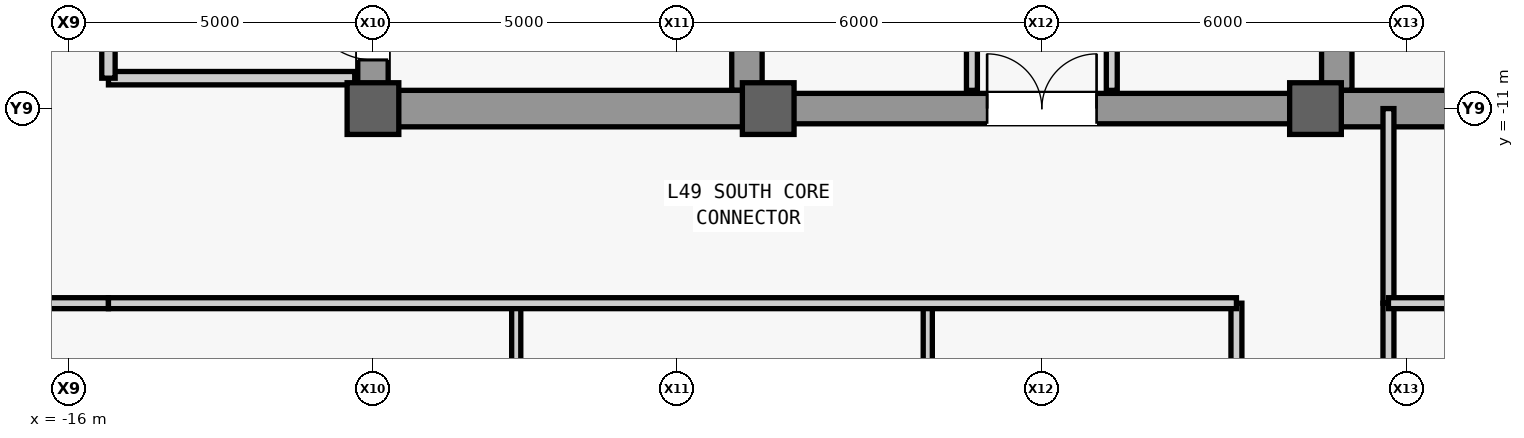
"""IFC4 building model, lengths in metres.
Left out: names, types, materials, properties, quantities, classifications, styles, units other than length and angle.
Written with IfcOpenShell. Run it as: python <this file> out.ifc"""

import sys

from ifc_helpers import new_model, si_unit, direction, frame, frame_2d, origin, origin_2d, place, context, subcontext, project, spatial, rectangle, extrude, source, transform, mapped, element, fill, save


model = new_model("IFC4")
c1 = context("Model", 3, precision=1e-05, world=origin(), true_north=direction((0.0, 1.0)))
c2 = subcontext(c1, "Body", "Model", "MODEL_VIEW")
j1 = project(units=[si_unit("LENGTHUNIT", "METRE"), si_unit("PLANEANGLEUNIT", "RADIAN")], contexts=[c1])
p1 = place(None, origin())
s1 = spatial("IfcSite", under=j1, at=p1, CompositionType="ELEMENT")
p2 = place(p1, origin())
s2 = spatial("IfcBuilding", under=s1, at=p2, CompositionType="ELEMENT")
p3 = place(p2, frame((0.0, 0.0, 211.1)))
s3 = spatial("IfcBuildingStorey", under=s2, at=p3, CompositionType="ELEMENT", Elevation=211.1)
m1 = source(origin(), c2, "Body", "SweptSolid", [
    extrude(rectangle(XDim=22.0, YDim=0.5, at=frame_2d((11.0, 0.0))), origin(), (0.0, 0.0, 1.0), 3.78),
])
p4 = place(p3, frame((-11.0, -11.0, 0.0), z_axis=(0.0, 0.0, 1.0), x_axis=(0.0, 1.0, 0.0)))
e1 = element("IfcWall", 1, at=p4, inside=s3, PredefinedType="SHEAR", context=c2, shape_type="MappedRepresentation", body=[
    mapped(m1, transform((0.0, 0.0, 0.0), scale=1.0)),
])
m2 = source(origin(), c2, "Body", "SweptSolid", [
    extrude(rectangle(XDim=1.1, YDim=2.2, at=frame_2d((0.55, 1.1))), frame((0.0, 0.26, 0.0), z_axis=(0.0, -1.0, 0.0), x_axis=(1.0, 0.0, 0.0)), (0.0, 0.0, 1.0), 0.52),
])
p5 = place(p4, frame((0.8, 0.0, 0.0)))
e2 = element("IfcOpeningElement", 2, at=p5, cuts=e1, PredefinedType="OPENING", context=c2, shape_type="MappedRepresentation", body=[
    mapped(m2, transform((0.0, 0.0, 0.0), scale=1.0)),
])
p6 = place(p4, frame((12.5, 0.0, 0.0)))
e3 = element("IfcOpeningElement", 3, at=p6, cuts=e1, PredefinedType="OPENING", context=c2, shape_type="MappedRepresentation", body=[
    mapped(m2, transform((0.0, 0.0, 0.0), scale=1.0)),
])
m3 = source(origin(), c2, "Body", "SweptSolid", [
    extrude(rectangle(XDim=0.9, YDim=2.15, at=frame_2d((0.45, 1.075))), frame((0.0, 0.26, 0.0), z_axis=(0.0, -1.0, 0.0), x_axis=(1.0, 0.0, 0.0)), (0.0, 0.0, 1.0), 0.52),
])
p7 = place(p4, frame((6.85, 0.0, 0.0)))
e4 = element("IfcOpeningElement", 4, at=p7, cuts=e1, PredefinedType="OPENING", context=c2, shape_type="MappedRepresentation", body=[
    mapped(m3, transform((0.0, 0.0, 0.0), scale=1.0)),
])
m4 = source(origin(), c2, "Body", "SweptSolid", [
    extrude(rectangle(XDim=1.3, YDim=2.3, at=frame_2d((0.65, 1.15))), frame((0.0, 0.26, 0.0), z_axis=(0.0, -1.0, 0.0), x_axis=(1.0, 0.0, 0.0)), (0.0, 0.0, 1.0), 0.52),
])
p8 = place(p4, frame((2.7, 0.0, 0.0)))
e5 = element("IfcOpeningElement", 5, at=p8, cuts=e1, PredefinedType="OPENING", context=c2, shape_type="MappedRepresentation", body=[
    mapped(m4, transform((0.0, 0.0, 0.0), scale=1.0)),
])
m5 = source(origin(), c2, "Body", "SweptSolid", [
    extrude(rectangle(XDim=21.4, YDim=0.5, at=frame_2d((10.7, 0.0))), origin(), (0.0, 0.0, 1.0), 3.78),
])
for number, where, z_axis, x_axis in (
    (6, (-4.85, -10.7, 0.0), (0.0, 0.0, 1.0), (0.0, 1.0, 0.0)),
    (7, (4.85, -10.7, 0.0), (0.0, 0.0, 1.0), (0.0, 1.0, 0.0)),
):
    element("IfcWall", number, at=place(p3, frame(where, z_axis=z_axis, x_axis=x_axis)), inside=s3, PredefinedType="SHEAR", context=c2, shape_type="MappedRepresentation", body=[
        mapped(m5, transform((0.0, 0.0, 0.0), scale=1.0)),
    ])
m6 = source(origin(), c2, "Body", "SweptSolid", [
    extrude(rectangle(XDim=5.9, YDim=0.6, at=frame_2d((2.95, 0.0))), origin(), (0.0, 0.0, 1.0), 3.78),
])
for number, where, z_axis, x_axis in (
    (8, (-10.75, -11.0, 0.0), (0.0, 0.0, 1.0), (1.0, 0.0, 0.0)),
    (9, (4.85, -11.0, 0.0), (0.0, 0.0, 1.0), (1.0, 0.0, 0.0)),
):
    element("IfcWall", number, at=place(p3, frame(where, z_axis=z_axis, x_axis=x_axis)), inside=s3, PredefinedType="SHEAR", context=c2, shape_type="MappedRepresentation", body=[
        mapped(m6, transform((0.0, 0.0, 0.0), scale=1.0)),
    ])
m7 = source(origin(), c2, "Body", "SweptSolid", [
    extrude(rectangle(XDim=9.2, YDim=0.5, at=frame_2d((4.6, 0.0))), origin(), (0.0, 0.0, 1.0), 3.78),
])
p9 = place(p3, frame((-4.6, -11.0, 0.0), z_axis=(0.0, 0.0, 1.0), x_axis=(1.0, 0.0, 0.0)))
e10 = element("IfcWall", 10, at=p9, inside=s3, PredefinedType="SHEAR", context=c2, shape_type="MappedRepresentation", body=[
    mapped(m7, transform((0.0, 0.0, 0.0), scale=1.0)),
])
m8 = source(origin(), c2, "Body", "SweptSolid", [
    extrude(rectangle(XDim=1.8, YDim=2.25, at=frame_2d((0.9, 1.125))), frame((0.0, 0.26, 0.0), z_axis=(0.0, -1.0, 0.0), x_axis=(1.0, 0.0, 0.0)), (0.0, 0.0, 1.0), 0.52),
])
p10 = place(p9, frame((3.7, 0.0, 0.0)))
e11 = element("IfcOpeningElement", 11, at=p10, cuts=e10, PredefinedType="OPENING", context=c2, shape_type="MappedRepresentation", body=[
    mapped(m8, transform((0.0, 0.0, 0.0), scale=1.0)),
])
m9 = source(origin(), c2, "Body", "SweptSolid", [
    extrude(rectangle(XDim=0.85, YDim=0.85, at=origin_2d()), origin(), (0.0, 0.0, 1.0), 4.0),
])
for number, where, z_axis, x_axis in (
    (12, (-11.0, -11.0, 0.0), (0.0, 0.0, 1.0), (1.0, 0.0, 0.0)),
    (13, (-4.5, -11.0, 0.0), (0.0, 0.0, 1.0), (1.0, 0.0, 0.0)),
    (14, (4.5, -11.0, 0.0), (0.0, 0.0, 1.0), (1.0, 0.0, 0.0)),
):
    element("IfcColumn", number, at=place(p3, frame(where, z_axis=z_axis, x_axis=x_axis)), inside=s3, PredefinedType="COLUMN", context=c2, shape_type="MappedRepresentation", body=[
        mapped(m9, transform((0.0, 0.0, 0.0), scale=1.0)),
    ])
m10 = source(origin(), c2, "Body", "SweptSolid", [
    extrude(rectangle(XDim=4.05, YDim=0.22, at=frame_2d((2.025, 0.0))), origin(), (0.0, 0.0, 1.0), 3.78),
])
p11 = place(p3, frame((-15.35, -10.5, 0.0), z_axis=(0.0, 0.0, 1.0), x_axis=(1.0, 0.0, 0.0)))
e15 = element("IfcWall", 15, at=p11, inside=s3, PredefinedType="PARTITIONING", context=c2, shape_type="MappedRepresentation", body=[
    mapped(m10, transform((0.0, 0.0, 0.0), scale=1.0)),
])
m11 = source(origin(), c2, "Body", "SweptSolid", [
    extrude(rectangle(XDim=4.4, YDim=0.22, at=frame_2d((2.2, 0.0))), origin(), (0.0, 0.0, 1.0), 3.78),
])
p12 = place(p3, frame((-15.35, -10.5, 0.0), z_axis=(0.0, 0.0, 1.0), x_axis=(0.0, 1.0, 0.0)))
e16 = element("IfcWall", 16, at=p12, inside=s3, PredefinedType="PARTITIONING", context=c2, shape_type="MappedRepresentation", body=[
    mapped(m11, transform((0.0, 0.0, 0.0), scale=1.0)),
])
m12 = source(origin(), c2, "Body", "SweptSolid", [
    extrude(rectangle(XDim=1.2, YDim=2.2, at=frame_2d((0.6, 1.1))), frame((0.0, 0.12, 0.0), z_axis=(0.0, -1.0, 0.0), x_axis=(1.0, 0.0, 0.0)), (0.0, 0.0, 1.0), 0.24),
])
p13 = place(p12, frame((1.6, 0.0, 0.0)))
e17 = element("IfcOpeningElement", 17, at=p13, cuts=e16, PredefinedType="OPENING", context=c2, shape_type="MappedRepresentation", body=[
    mapped(m12, transform((0.0, 0.0, 0.0), scale=1.0)),
])
m13 = source(origin(), c2, "Body", "SweptSolid", [
    extrude(rectangle(XDim=5.4, YDim=0.18, at=frame_2d((2.7, 0.0))), origin(), (0.0, 0.0, 1.0), 3.78),
])
p14 = place(p3, frame((-1.15, -10.7, 0.0), z_axis=(0.0, 0.0, 1.0), x_axis=(0.0, 1.0, 0.0)))
e18 = element("IfcWall", 18, at=p14, inside=s3, PredefinedType="PARTITIONING", context=c2, shape_type="MappedRepresentation", body=[
    mapped(m13, transform((0.0, 0.0, 0.0), scale=1.0)),
])
m14 = source(origin(), c2, "Body", "SweptSolid", [
    extrude(rectangle(XDim=0.9, YDim=2.15, at=frame_2d((0.45, 1.075))), frame((0.0, 0.1, 0.0), z_axis=(0.0, -1.0, 0.0), x_axis=(1.0, 0.0, 0.0)), (0.0, 0.0, 1.0), 0.2),
])
p15 = place(p14, frame((0.9, 0.0, 0.0)))
e19 = element("IfcOpeningElement", 19, at=p15, cuts=e18, PredefinedType="OPENING", context=c2, shape_type="MappedRepresentation", body=[
    mapped(m14, transform((0.0, 0.0, 0.0), scale=1.0)),
])
p16 = place(p14, frame((3.6, 0.0, 0.0)))
e20 = element("IfcOpeningElement", 20, at=p16, cuts=e18, PredefinedType="OPENING", context=c2, shape_type="MappedRepresentation", body=[
    mapped(m14, transform((0.0, 0.0, 0.0), scale=1.0)),
])
p17 = place(p3, frame((1.15, -10.7, 0.0), z_axis=(0.0, 0.0, 1.0), x_axis=(0.0, 1.0, 0.0)))
e21 = element("IfcWall", 21, at=p17, inside=s3, PredefinedType="PARTITIONING", context=c2, shape_type="MappedRepresentation", body=[
    mapped(m13, transform((0.0, 0.0, 0.0), scale=1.0)),
])
p18 = place(p17, frame((2.25, 0.0, 0.0)))
e22 = element("IfcOpeningElement", 22, at=p18, cuts=e21, PredefinedType="OPENING", context=c2, shape_type="MappedRepresentation", body=[
    mapped(m14, transform((0.0, 0.0, 0.0), scale=1.0)),
])
m15 = source(origin(), c2, "Body", "SweptSolid", [
    extrude(rectangle(XDim=2.45, YDim=0.18, at=frame_2d((1.225, 0.0))), origin(), (0.0, 0.0, 1.0), 3.78),
])
p19 = place(p3, frame((-17.8, -14.2, 0.0), z_axis=(0.0, 0.0, 1.0), x_axis=(1.0, 0.0, 0.0)))
e23 = element("IfcWall", 23, at=p19, inside=s3, PredefinedType="PARTITIONING", context=c2, shape_type="MappedRepresentation", body=[
    mapped(m15, transform((0.0, 0.0, 0.0), scale=1.0)),
])
m16 = source(origin(), c2, "Body", "SweptSolid", [
    extrude(rectangle(XDim=3.2, YDim=0.18, at=frame_2d((1.6, 0.0))), origin(), (0.0, 0.0, 1.0), 3.085),
])
p20 = place(p3, frame((5.7, -14.2, 0.0), z_axis=(0.0, 0.0, 1.0), x_axis=(0.0, 1.0, 0.0)))
e24 = element("IfcWall", 24, at=p20, inside=s3, PredefinedType="PARTITIONING", context=c2, shape_type="MappedRepresentation", body=[
    mapped(m16, transform((0.0, 0.0, 0.0), scale=1.0)),
])
m17 = source(origin(), c2, "Body", "SweptSolid", [
    extrude(rectangle(XDim=15.8, YDim=0.15, at=frame_2d((7.9, 0.0))), origin(), (0.0, 0.0, 1.0), 3.78),
])
p21 = place(p3, frame((-8.644, -30.0, 0.0), z_axis=(0.0, 0.0, 1.0), x_axis=(0.0, 1.0, 0.0)))
e25 = element("IfcWall", 25, at=p21, inside=s3, PredefinedType="PARTITIONING", context=c2, shape_type="MappedRepresentation", body=[
    mapped(m17, transform((0.0, 0.0, 0.0), scale=1.0)),
])
m18 = source(origin(), c2, "Body", "SweptSolid", [
    extrude(rectangle(XDim=0.95, YDim=2.15, at=frame_2d((0.475, 1.075))), frame((0.0, 0.085, 0.0), z_axis=(0.0, -1.0, 0.0), x_axis=(1.0, 0.0, 0.0)), (0.0, 0.0, 1.0), 0.17),
])
p22 = place(p21, frame((11.375, 0.0, 0.0)))
e26 = element("IfcOpeningElement", 26, at=p22, cuts=e25, PredefinedType="OPENING", context=c2, shape_type="MappedRepresentation", body=[
    mapped(m18, transform((0.0, 0.0, 0.0), scale=1.0)),
])
p23 = place(p3, frame((-1.876, -30.0, 0.0), z_axis=(0.0, 0.0, 1.0), x_axis=(0.0, 1.0, 0.0)))
e27 = element("IfcWall", 27, at=p23, inside=s3, PredefinedType="PARTITIONING", context=c2, shape_type="MappedRepresentation", body=[
    mapped(m17, transform((0.0, 0.0, 0.0), scale=1.0)),
])
p24 = place(p23, frame((11.375, 0.0, 0.0)))
e28 = element("IfcOpeningElement", 28, at=p24, cuts=e27, PredefinedType="OPENING", context=c2, shape_type="MappedRepresentation", body=[
    mapped(m18, transform((0.0, 0.0, 0.0), scale=1.0)),
])
m19 = source(origin(), c2, "Body", "SweptSolid", [
    extrude(rectangle(XDim=15.8, YDim=0.18, at=frame_2d((7.9, 0.0))), origin(), (0.0, 0.0, 1.0), 3.78),
])
p25 = place(p3, frame((3.2, -30.0, 0.0), z_axis=(0.0, 0.0, 1.0), x_axis=(0.0, 1.0, 0.0)))
e29 = element("IfcWall", 29, at=p25, inside=s3, PredefinedType="PARTITIONING", context=c2, shape_type="MappedRepresentation", body=[
    mapped(m19, transform((0.0, 0.0, 0.0), scale=1.0)),
])
m20 = source(origin(), c2, "Body", "SweptSolid", [
    extrude(rectangle(XDim=1.05, YDim=2.2, at=frame_2d((0.525, 1.1))), frame((0.0, 0.1, 0.0), z_axis=(0.0, -1.0, 0.0), x_axis=(1.0, 0.0, 0.0)), (0.0, 0.0, 1.0), 0.2),
])
p26 = place(p25, frame((3.425, 0.0, 0.0)))
e30 = element("IfcOpeningElement", 30, at=p26, cuts=e29, PredefinedType="OPENING", context=c2, shape_type="MappedRepresentation", body=[
    mapped(m20, transform((0.0, 0.0, 0.0), scale=1.0)),
])
m21 = source(origin(), c2, "Body", "SweptSolid", [
    extrude(rectangle(XDim=18.55, YDim=0.18, at=frame_2d((9.275, 0.0))), origin(), (0.0, 0.0, 1.0), 3.78),
])
p27 = place(p3, frame((-15.35, -14.2, 0.0), z_axis=(0.0, 0.0, 1.0), x_axis=(1.0, 0.0, 0.0)))
e31 = element("IfcWall", 31, at=p27, inside=s3, PredefinedType="PARTITIONING", context=c2, shape_type="MappedRepresentation", body=[
    mapped(m21, transform((0.0, 0.0, 0.0), scale=1.0)),
])
m22 = source(origin(), c2, "Body", "SweptSolid", [
    extrude(rectangle(XDim=15.8, YDim=0.18, at=frame_2d((7.9, 0.0))), origin(), (0.0, 0.0, 1.0), 3.085),
])
p28 = place(p3, frame((5.7, -30.0, 0.0), z_axis=(0.0, 0.0, 1.0), x_axis=(0.0, 1.0, 0.0)))
e32 = element("IfcWall", 32, at=p28, inside=s3, PredefinedType="PARTITIONING", context=c2, shape_type="MappedRepresentation", body=[
    mapped(m22, transform((0.0, 0.0, 0.0), scale=1.0)),
])
p29 = place(p28, frame((3.425, 0.0, 0.0)))
e33 = element("IfcOpeningElement", 33, at=p29, cuts=e32, PredefinedType="OPENING", context=c2, shape_type="MappedRepresentation", body=[
    mapped(m20, transform((0.0, 0.0, 0.0), scale=1.0)),
])
m23 = source(origin(), c2, "Body", "SweptSolid", [
    extrude(rectangle(XDim=9.65, YDim=0.18, at=frame_2d((4.825, 0.0))), origin(), (0.0, 0.0, 1.0), 3.78),
])
p30 = place(p3, frame((5.7, -14.2, 0.0), z_axis=(0.0, 0.0, 1.0), x_axis=(1.0, 0.0, 0.0)))
e34 = element("IfcWall", 34, at=p30, inside=s3, PredefinedType="PARTITIONING", context=c2, shape_type="MappedRepresentation", body=[
    mapped(m23, transform((0.0, 0.0, 0.0), scale=1.0)),
])
m24 = source(origin(), c2, "Body", "SweptSolid", [
    extrude(rectangle(XDim=1.1, YDim=2.2, at=frame_2d((0.55, 1.1))), frame((0.0, 0.025, 0.0), z_axis=(0.0, -1.0, 0.0), x_axis=(1.0, 0.0, 0.0)), (0.0, 0.0, 1.0), 0.05),
])
p31 = place(p5, origin())
e35 = element("IfcDoor", 35, at=p31, inside=s3, OperationType="SINGLE_SWING_RIGHT", PredefinedType="DOOR", context=c2, shape_type="MappedRepresentation", body=[
    mapped(m24, transform((0.0, 0.0, 0.0), scale=1.0)),
])
fill(e2, e35)
m25 = source(origin(), c2, "Body", "SweptSolid", [
    extrude(rectangle(XDim=1.8, YDim=2.25, at=frame_2d((0.9, 1.125))), frame((0.0, 0.025, 0.0), z_axis=(0.0, -1.0, 0.0), x_axis=(1.0, 0.0, 0.0)), (0.0, 0.0, 1.0), 0.05),
])
p32 = place(p10, origin())
e36 = element("IfcDoor", 36, at=p32, inside=s3, OperationType="SINGLE_SWING_LEFT", PredefinedType="DOOR", context=c2, shape_type="MappedRepresentation", body=[
    mapped(m25, transform((0.0, 0.0, 0.0), scale=1.0)),
])
fill(e11, e36)
save(model, sys.argv[1])
